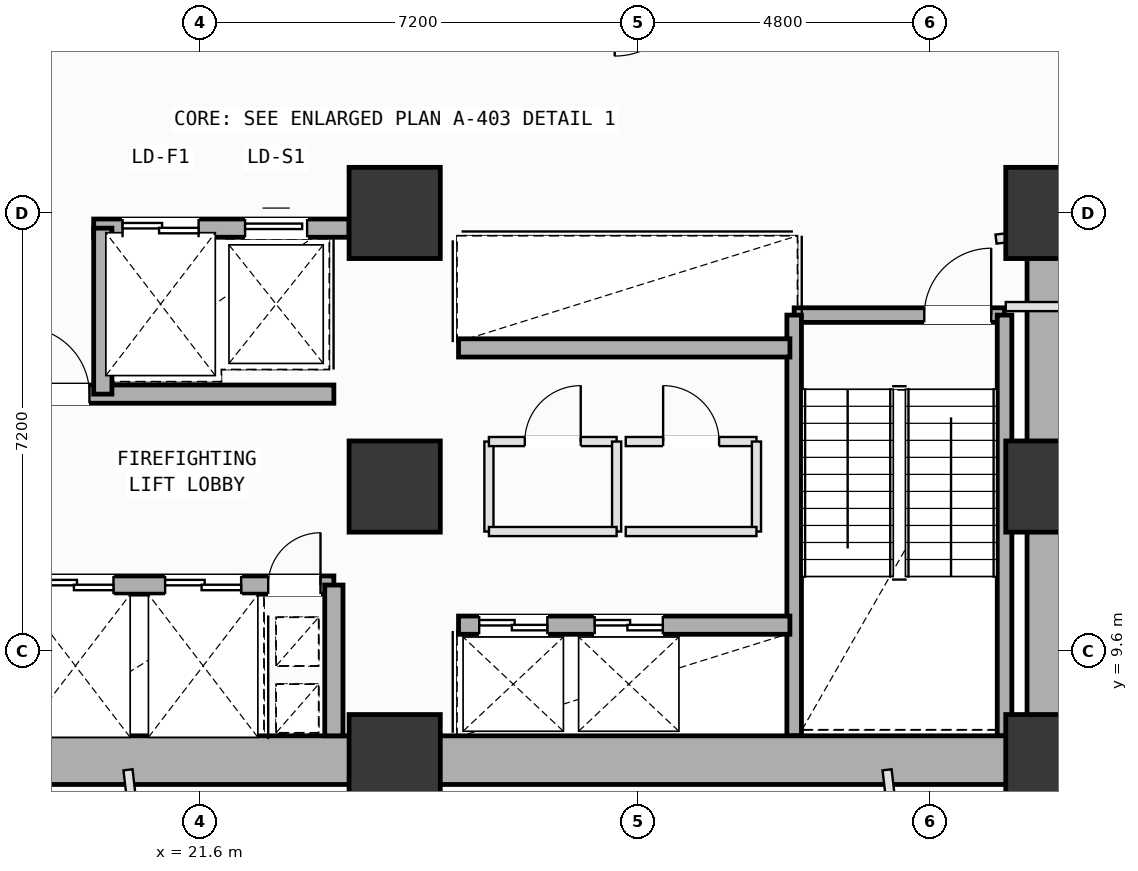
"""IFC4 building model, lengths in metres.
Left out: names, types, materials, properties, quantities, classifications, styles, units other than length and angle.
Written with IfcOpenShell. Run it as: python <this file> out.ifc"""

import sys

from ifc_helpers import new_model, si_unit, direction, frame, frame_2d, origin, origin_2d, place, context, subcontext, project, spatial, rectangle, extrude, element, fill, save


model = new_model("IFC4")
c1 = context("Model", 3, precision=1e-05, world=origin(), true_north=direction((0.0, 1.0)))
c2 = subcontext(c1, "Body", "Model", "MODEL_VIEW")
j1 = project(units=[si_unit("LENGTHUNIT", "METRE"), si_unit("PLANEANGLEUNIT", "RADIAN")], contexts=[c1])
p1 = place(None, origin())
s1 = spatial("IfcSite", under=j1, at=p1, CompositionType="ELEMENT")
p2 = place(p1, origin())
s2 = spatial("IfcBuilding", under=s1, at=p2, CompositionType="ELEMENT")
p3 = place(p2, frame((0.0, 0.0, 51.0)))
s3 = spatial("IfcBuildingStorey", under=s2, at=p3, CompositionType="ELEMENT", Elevation=51.0)
for number, where, z_axis, x_axis in (
    (1, (24.8, 7.8, 0.0), (0.0, 0.0, 1.0), (1.0, 0.0, 0.0)),
    (2, (24.8, 12.3, 0.0), (0.0, 0.0, 1.0), (1.0, 0.0, 0.0)),
    (3, (24.8, 16.8, 0.0), (0.0, 0.0, 1.0), (1.0, 0.0, 0.0)),
    (4, (35.6, 7.8, 0.0), (0.0, 0.0, 1.0), (1.0, 0.0, 0.0)),
    (5, (35.6, 12.3, 0.0), (0.0, 0.0, 1.0), (1.0, 0.0, 0.0)),
    (6, (35.6, 16.8, 0.0), (0.0, 0.0, 1.0), (1.0, 0.0, 0.0)),
):
    element("IfcColumn", number, at=place(p3, frame(where, z_axis=z_axis, x_axis=x_axis)), inside=s3, PredefinedType="COLUMN", context=c2, shape_type="SweptSolid", body=[
        extrude(rectangle(XDim=1.5, YDim=1.5, at=origin_2d()), origin(), (0.0, 0.0, 1.0), 4.0),
    ])
p4 = place(p3, frame((31.37, 15.12, 0.0), z_axis=(0.0, 0.0, 1.0), x_axis=(1.0, 0.0, 0.0)))
e7 = element("IfcWall", 7, at=p4, inside=s3, PredefinedType="SOLIDWALL", context=c2, shape_type="SweptSolid", body=[
    extrude(rectangle(XDim=3.46, YDim=0.24, at=frame_2d((1.73, 0.0))), origin(), (0.0, 0.0, 1.0), 3.78),
])
p5 = place(p4, frame((2.14, 0.0, 0.0)))
e8 = element("IfcOpeningElement", 8, at=p5, cuts=e7, PredefinedType="OPENING", context=c2, shape_type="SweptSolid", body=[
    extrude(rectangle(XDim=1.1, YDim=2.15, at=frame_2d((0.55, 1.075))), frame((0.0, 0.13, 0.0), z_axis=(0.0, -1.0, 0.0), x_axis=(1.0, 0.0, 0.0)), (0.0, 0.0, 1.0), 0.26),
])
for number, where, z_axis, x_axis in (
    (9, (34.83, 15.12, 0.0), (0.0, 0.0, 1.0), (0.0, -1.0, 0.0)),
    (10, (31.37, 8.2, 0.0), (0.0, 0.0, 1.0), (0.0, 1.0, 0.0)),
):
    element("IfcWall", number, at=place(p3, frame(where, z_axis=z_axis, x_axis=x_axis)), inside=s3, PredefinedType="SOLIDWALL", context=c2, shape_type="SweptSolid", body=[
        extrude(rectangle(XDim=6.92, YDim=0.24, at=frame_2d((3.46, 0.0))), origin(), (0.0, 0.0, 1.0), 3.78),
    ])
for number, where, z_axis, x_axis in (
    (11, (14.0, 7.8, 0.0), (0.0, 0.0, 1.0), (1.0, 0.0, 0.0)),
    (12, (24.8, 7.8, 0.0), (0.0, 0.0, 1.0), (1.0, 0.0, 0.0)),
):
    element("IfcWall", number, at=place(p3, frame(where, z_axis=z_axis, x_axis=x_axis)), inside=s3, PredefinedType="SHEAR", context=c2, shape_type="SweptSolid", body=[
        extrude(rectangle(XDim=10.8, YDim=0.8, at=frame_2d((5.4, 0.0))), origin(), (0.0, 0.0, 1.0), 3.78),
    ])
p6 = place(p3, frame((35.6, 7.8, 0.0), z_axis=(0.0, 0.0, 1.0), x_axis=(0.0, 1.0, 0.0)))
e13 = element("IfcWall", 13, at=p6, inside=s3, PredefinedType="SHEAR", context=c2, shape_type="SweptSolid", body=[
    extrude(rectangle(XDim=9.0, YDim=0.8, at=frame_2d((4.5, 0.0))), origin(), (0.0, 0.0, 1.0), 3.78),
])
p7 = place(p3, frame((19.85, 16.55, 0.0), z_axis=(0.0, 0.0, 1.0), x_axis=(1.0, 0.0, 0.0)))
e14 = element("IfcWall", 14, at=p7, inside=s3, PredefinedType="SOLIDWALL", context=c2, shape_type="SweptSolid", body=[
    extrude(rectangle(XDim=4.2, YDim=0.3, at=frame_2d((2.1, 0.0))), origin(), (0.0, 0.0, 1.0), 3.78),
])
p8 = place(p7, frame((0.475, 0.0, 0.0)))
e15 = element("IfcOpeningElement", 15, at=p8, cuts=e14, PredefinedType="OPENING", context=c2, shape_type="SweptSolid", body=[
    extrude(rectangle(XDim=1.25, YDim=2.18, at=frame_2d((0.625, 1.09))), frame((0.0, 0.16, 0.0), z_axis=(0.0, -1.0, 0.0), x_axis=(1.0, 0.0, 0.0)), (0.0, 0.0, 1.0), 0.32),
])
p9 = place(p7, frame((2.49, 0.0, 0.0)))
e16 = element("IfcOpeningElement", 16, at=p9, cuts=e14, PredefinedType="OPENING", context=c2, shape_type="SweptSolid", body=[
    extrude(rectangle(XDim=1.02, YDim=2.12, at=frame_2d((0.51, 1.06))), frame((0.0, 0.16, 0.0), z_axis=(0.0, -1.0, 0.0), x_axis=(1.0, 0.0, 0.0)), (0.0, 0.0, 1.0), 0.32),
])
p10 = place(p3, frame((18.5, 10.68, 0.0), z_axis=(0.0, 0.0, 1.0), x_axis=(1.0, 0.0, 0.0)))
e17 = element("IfcWall", 17, at=p10, inside=s3, PredefinedType="SOLIDWALL", context=c2, shape_type="SweptSolid", body=[
    extrude(rectangle(XDim=5.3, YDim=0.3, at=frame_2d((2.65, 0.0))), origin(), (0.0, 0.0, 1.0), 3.78),
])
p11 = place(p10, frame((4.22, 0.0, 0.0)))
e18 = element("IfcOpeningElement", 18, at=p11, cuts=e17, PredefinedType="OPENING", context=c2, shape_type="SweptSolid", body=[
    extrude(rectangle(XDim=0.86, YDim=2.06, at=frame_2d((0.43, 1.03))), frame((0.0, 0.16, 0.0), z_axis=(0.0, -1.0, 0.0), x_axis=(1.0, 0.0, 0.0)), (0.0, 0.0, 1.0), 0.32),
])
p12 = place(p10, frame((0.425, 0.0, 0.0)))
e19 = element("IfcOpeningElement", 19, at=p12, cuts=e17, PredefinedType="OPENING", context=c2, shape_type="SweptSolid", body=[
    extrude(rectangle(XDim=1.25, YDim=2.18, at=frame_2d((0.625, 1.09))), frame((0.0, 0.16, 0.0), z_axis=(0.0, -1.0, 0.0), x_axis=(1.0, 0.0, 0.0)), (0.0, 0.0, 1.0), 0.32),
])
p13 = place(p10, frame((2.525, 0.0, 0.0)))
e20 = element("IfcOpeningElement", 20, at=p13, cuts=e17, PredefinedType="OPENING", context=c2, shape_type="SweptSolid", body=[
    extrude(rectangle(XDim=1.25, YDim=2.18, at=frame_2d((0.625, 1.09))), frame((0.0, 0.16, 0.0), z_axis=(0.0, -1.0, 0.0), x_axis=(1.0, 0.0, 0.0)), (0.0, 0.0, 1.0), 0.32),
])
p14 = place(p3, frame((18.5, 13.82, 0.0), z_axis=(0.0, 0.0, 1.0), x_axis=(1.0, 0.0, 0.0)))
e21 = element("IfcWall", 21, at=p14, inside=s3, PredefinedType="SOLIDWALL", context=c2, shape_type="SweptSolid", body=[
    extrude(rectangle(XDim=5.3, YDim=0.3, at=frame_2d((2.65, 0.0))), origin(), (0.0, 0.0, 1.0), 3.78),
])
p15 = place(p14, frame((0.18, 0.0, 0.0)))
e22 = element("IfcOpeningElement", 22, at=p15, cuts=e21, PredefinedType="OPENING", context=c2, shape_type="SweptSolid", body=[
    extrude(rectangle(XDim=1.1, YDim=2.15, at=frame_2d((0.55, 1.075))), frame((0.0, 0.16, 0.0), z_axis=(0.0, -1.0, 0.0), x_axis=(1.0, 0.0, 0.0)), (0.0, 0.0, 1.0), 0.32),
])
p16 = place(p3, frame((23.8, 8.2, 0.0), z_axis=(0.0, 0.0, 1.0), x_axis=(0.0, 1.0, 0.0)))
e23 = element("IfcWall", 23, at=p16, inside=s3, PredefinedType="SOLIDWALL", context=c2, shape_type="SweptSolid", body=[
    extrude(rectangle(XDim=2.48, YDim=0.3, at=frame_2d((1.24, 0.0))), origin(), (0.0, 0.0, 1.0), 3.78),
])
p17 = place(p3, frame((20.0, 13.82, 0.0), z_axis=(0.0, 0.0, 1.0), x_axis=(0.0, 1.0, 0.0)))
e24 = element("IfcWall", 24, at=p17, inside=s3, PredefinedType="SOLIDWALL", context=c2, shape_type="SweptSolid", body=[
    extrude(rectangle(XDim=2.73, YDim=0.3, at=frame_2d((1.365, 0.0))), origin(), (0.0, 0.0, 1.0), 3.78),
])
p18 = place(p3, frame((25.85, 10.02, 0.0), z_axis=(0.0, 0.0, 1.0), x_axis=(1.0, 0.0, 0.0)))
e25 = element("IfcWall", 25, at=p18, inside=s3, PredefinedType="SOLIDWALL", context=c2, shape_type="SweptSolid", body=[
    extrude(rectangle(XDim=5.45, YDim=0.3, at=frame_2d((2.725, 0.0))), origin(), (0.0, 0.0, 1.0), 3.78),
])
p19 = place(p18, frame((0.34, 0.0, 0.0)))
e26 = element("IfcOpeningElement", 26, at=p19, cuts=e25, PredefinedType="OPENING", context=c2, shape_type="SweptSolid", body=[
    extrude(rectangle(XDim=1.12, YDim=2.15, at=frame_2d((0.56, 1.075))), frame((0.0, 0.16, 0.0), z_axis=(0.0, -1.0, 0.0), x_axis=(1.0, 0.0, 0.0)), (0.0, 0.0, 1.0), 0.32),
])
p20 = place(p18, frame((2.24, 0.0, 0.0)))
e27 = element("IfcOpeningElement", 27, at=p20, cuts=e25, PredefinedType="OPENING", context=c2, shape_type="SweptSolid", body=[
    extrude(rectangle(XDim=1.12, YDim=2.15, at=frame_2d((0.56, 1.075))), frame((0.0, 0.16, 0.0), z_axis=(0.0, -1.0, 0.0), x_axis=(1.0, 0.0, 0.0)), (0.0, 0.0, 1.0), 0.32),
])
p21 = place(p3, frame((25.85, 14.58, 0.0), z_axis=(0.0, 0.0, 1.0), x_axis=(1.0, 0.0, 0.0)))
e28 = element("IfcWall", 28, at=p21, inside=s3, PredefinedType="SOLIDWALL", context=c2, shape_type="SweptSolid", body=[
    extrude(rectangle(XDim=5.45, YDim=0.3, at=frame_2d((2.725, 0.0))), origin(), (0.0, 0.0, 1.0), 3.78),
])
p22 = place(p3, frame((26.35, 11.56, 0.0), z_axis=(0.0, 0.0, 1.0), x_axis=(0.0, 1.0, 0.0)))
e29 = element("IfcWall", 29, at=p22, inside=s3, PredefinedType="PARTITIONING", context=c2, shape_type="SweptSolid", body=[
    extrude(rectangle(XDim=1.48, YDim=0.15, at=frame_2d((0.74, 0.0))), origin(), (0.0, 0.0, 1.0), 3.78),
])
p23 = place(p3, frame((26.35, 13.04, 0.0), z_axis=(0.0, 0.0, 1.0), x_axis=(1.0, 0.0, 0.0)))
e30 = element("IfcWall", 30, at=p23, inside=s3, PredefinedType="PARTITIONING", context=c2, shape_type="SweptSolid", body=[
    extrude(rectangle(XDim=2.1, YDim=0.15, at=frame_2d((1.05, 0.0))), origin(), (0.0, 0.0, 1.0), 3.78),
])
p24 = place(p23, frame((0.59, 0.0, 0.0)))
e31 = element("IfcOpeningElement", 31, at=p24, cuts=e30, PredefinedType="OPENING", context=c2, shape_type="SweptSolid", body=[
    extrude(rectangle(XDim=0.92, YDim=2.1, at=frame_2d((0.46, 1.05))), frame((0.0, 0.085, 0.0), z_axis=(0.0, -1.0, 0.0), x_axis=(1.0, 0.0, 0.0)), (0.0, 0.0, 1.0), 0.17),
])
p25 = place(p3, frame((28.45, 13.04, 0.0), z_axis=(0.0, 0.0, 1.0), x_axis=(0.0, -1.0, 0.0)))
e32 = element("IfcWall", 32, at=p25, inside=s3, PredefinedType="PARTITIONING", context=c2, shape_type="SweptSolid", body=[
    extrude(rectangle(XDim=1.48, YDim=0.15, at=frame_2d((0.74, 0.0))), origin(), (0.0, 0.0, 1.0), 3.78),
])
p26 = place(p3, frame((28.45, 11.56, 0.0), z_axis=(0.0, 0.0, 1.0), x_axis=(-1.0, 0.0, 0.0)))
e33 = element("IfcWall", 33, at=p26, inside=s3, PredefinedType="PARTITIONING", context=c2, shape_type="SweptSolid", body=[
    extrude(rectangle(XDim=2.1, YDim=0.15, at=frame_2d((1.05, 0.0))), origin(), (0.0, 0.0, 1.0), 3.78),
])
p27 = place(p3, frame((28.6, 13.04, 0.0), z_axis=(0.0, 0.0, 1.0), x_axis=(1.0, 0.0, 0.0)))
e34 = element("IfcWall", 34, at=p27, inside=s3, PredefinedType="PARTITIONING", context=c2, shape_type="SweptSolid", body=[
    extrude(rectangle(XDim=2.15, YDim=0.15, at=frame_2d((1.075, 0.0))), origin(), (0.0, 0.0, 1.0), 3.78),
])
p28 = place(p27, frame((0.615, 0.0, 0.0)))
e35 = element("IfcOpeningElement", 35, at=p28, cuts=e34, PredefinedType="OPENING", context=c2, shape_type="SweptSolid", body=[
    extrude(rectangle(XDim=0.92, YDim=2.1, at=frame_2d((0.46, 1.05))), frame((0.0, 0.085, 0.0), z_axis=(0.0, -1.0, 0.0), x_axis=(1.0, 0.0, 0.0)), (0.0, 0.0, 1.0), 0.17),
])
p29 = place(p3, frame((30.75, 13.04, 0.0), z_axis=(0.0, 0.0, 1.0), x_axis=(0.0, -1.0, 0.0)))
e36 = element("IfcWall", 36, at=p29, inside=s3, PredefinedType="PARTITIONING", context=c2, shape_type="SweptSolid", body=[
    extrude(rectangle(XDim=1.48, YDim=0.15, at=frame_2d((0.74, 0.0))), origin(), (0.0, 0.0, 1.0), 3.78),
])
p30 = place(p3, frame((30.75, 11.56, 0.0), z_axis=(0.0, 0.0, 1.0), x_axis=(-1.0, 0.0, 0.0)))
e37 = element("IfcWall", 37, at=p30, inside=s3, PredefinedType="PARTITIONING", context=c2, shape_type="SweptSolid", body=[
    extrude(rectangle(XDim=2.15, YDim=0.15, at=frame_2d((1.075, 0.0))), origin(), (0.0, 0.0, 1.0), 3.78),
])
p31 = place(p3, frame((20.414, 7.641, 0.0), z_axis=(0.0, 0.0, 1.0), x_axis=(0.115769975506, -0.993276050638, 0.0)))
e38 = element("IfcWall", 38, at=p31, inside=s3, PredefinedType="PARTITIONING", context=c2, shape_type="SweptSolid", body=[
    extrude(rectangle(XDim=6.599, YDim=0.15, at=frame_2d((3.299, 0.0))), origin(), (0.0, 0.0, 1.0), 3.78),
])
p32 = place(p31, frame((3.02, 0.0, 0.0)))
e39 = element("IfcOpeningElement", 39, at=p32, cuts=e38, PredefinedType="OPENING", context=c2, shape_type="SweptSolid", body=[
    extrude(rectangle(XDim=0.86, YDim=2.06, at=frame_2d((0.43, 1.03))), frame((0.0, 0.085, 0.0), z_axis=(0.0, -1.0, 0.0), x_axis=(1.0, 0.0, 0.0)), (0.0, 0.0, 1.0), 0.17),
])
p33 = place(p3, frame((32.898, 7.641, 0.0), z_axis=(0.0, 0.0, 1.0), x_axis=(0.115606435858, -0.99329509814, 0.0)))
e40 = element("IfcWall", 40, at=p33, inside=s3, PredefinedType="PARTITIONING", context=c2, shape_type="SweptSolid", body=[
    extrude(rectangle(XDim=5.518, YDim=0.15, at=frame_2d((2.759, 0.0))), origin(), (0.0, 0.0, 1.0), 3.78),
])
p34 = place(p33, frame((2.48, 0.0, 0.0)))
e41 = element("IfcOpeningElement", 41, at=p34, cuts=e40, PredefinedType="OPENING", context=c2, shape_type="SweptSolid", body=[
    extrude(rectangle(XDim=0.86, YDim=2.06, at=frame_2d((0.43, 1.03))), frame((0.0, 0.085, 0.0), z_axis=(0.0, -1.0, 0.0), x_axis=(1.0, 0.0, 0.0)), (0.0, 0.0, 1.0), 0.17),
])
p35 = place(p3, frame((35.6, 7.5, 0.0), z_axis=(0.0, 0.0, 1.0), x_axis=(1.0, 0.0, 0.0)))
e42 = element("IfcWall", 42, at=p35, inside=s3, PredefinedType="PARTITIONING", context=c2, shape_type="SweptSolid", body=[
    extrude(rectangle(XDim=0.55, YDim=0.15, at=frame_2d((0.275, 0.0))), origin(), (0.0, 0.0, 1.0), 3.78),
])
p36 = place(p3, frame((36.15, 15.26, 0.0), z_axis=(0.0, 0.0, 1.0), x_axis=(-1.0, 0.0, 0.0)))
e43 = element("IfcWall", 43, at=p36, inside=s3, PredefinedType="PARTITIONING", context=c2, shape_type="SweptSolid", body=[
    extrude(rectangle(XDim=1.3, YDim=0.15, at=frame_2d((0.65, 0.0))), origin(), (0.0, 0.0, 1.0), 3.78),
])
p37 = place(p3, frame((34.69, 16.37, 0.0), z_axis=(0.0, 0.0, 1.0), x_axis=(0.993332795397, 0.115282078349, 0.0)))
e44 = element("IfcWall", 44, at=p37, inside=s3, PredefinedType="PARTITIONING", context=c2, shape_type="SweptSolid", body=[
    extrude(rectangle(XDim=1.127, YDim=0.15, at=frame_2d((0.563, 0.0))), origin(), (0.0, 0.0, 1.0), 2.865),
])
p38 = place(p5, origin())
e45 = element("IfcDoor", 45, at=p38, inside=s3, OperationType="SINGLE_SWING_RIGHT", PredefinedType="DOOR", context=c2, shape_type="SweptSolid", body=[
    extrude(rectangle(XDim=1.1, YDim=2.15, at=frame_2d((0.55, 1.075))), frame((0.0, 0.025, 0.0), z_axis=(0.0, -1.0, 0.0), x_axis=(1.0, 0.0, 0.0)), (0.0, 0.0, 1.0), 0.05),
])
fill(e8, e45)
p39 = place(p11, origin())
e46 = element("IfcDoor", 46, at=p39, inside=s3, OperationType="SINGLE_SWING_RIGHT", PredefinedType="DOOR", context=c2, shape_type="SweptSolid", body=[
    extrude(rectangle(XDim=0.86, YDim=2.06, at=frame_2d((0.43, 1.03))), frame((0.0, 0.025, 0.0), z_axis=(0.0, -1.0, 0.0), x_axis=(1.0, 0.0, 0.0)), (0.0, 0.0, 1.0), 0.05),
])
fill(e18, e46)
p40 = place(p15, origin())
e47 = element("IfcDoor", 47, at=p40, inside=s3, OperationType="SINGLE_SWING_LEFT", PredefinedType="DOOR", context=c2, shape_type="SweptSolid", body=[
    extrude(rectangle(XDim=1.1, YDim=2.15, at=frame_2d((0.55, 1.075))), frame((0.0, 0.025, 0.0), z_axis=(0.0, -1.0, 0.0), x_axis=(1.0, 0.0, 0.0)), (0.0, 0.0, 1.0), 0.05),
])
fill(e22, e47)
p41 = place(p12, origin())
e48 = element("IfcDoor", 48, at=p41, inside=s3, OperationType="DOUBLE_DOOR_SLIDING", PredefinedType="DOOR", context=c2, shape_type="SweptSolid", body=[
    extrude(rectangle(XDim=1.25, YDim=2.18, at=frame_2d((0.625, 1.09))), frame((0.0, 0.025, 0.0), z_axis=(0.0, -1.0, 0.0), x_axis=(1.0, 0.0, 0.0)), (0.0, 0.0, 1.0), 0.05),
])
fill(e19, e48)
p42 = place(p13, origin())
e49 = element("IfcDoor", 49, at=p42, inside=s3, OperationType="DOUBLE_DOOR_SLIDING", PredefinedType="DOOR", context=c2, shape_type="SweptSolid", body=[
    extrude(rectangle(XDim=1.25, YDim=2.18, at=frame_2d((0.625, 1.09))), frame((0.0, 0.025, 0.0), z_axis=(0.0, -1.0, 0.0), x_axis=(1.0, 0.0, 0.0)), (0.0, 0.0, 1.0), 0.05),
])
fill(e20, e49)
p43 = place(p19, origin())
e50 = element("IfcDoor", 50, at=p43, inside=s3, OperationType="DOUBLE_DOOR_SLIDING", PredefinedType="DOOR", context=c2, shape_type="SweptSolid", body=[
    extrude(rectangle(XDim=1.12, YDim=2.15, at=frame_2d((0.56, 1.075))), frame((0.0, 0.025, 0.0), z_axis=(0.0, -1.0, 0.0), x_axis=(1.0, 0.0, 0.0)), (0.0, 0.0, 1.0), 0.05),
])
fill(e26, e50)
p44 = place(p20, origin())
e51 = element("IfcDoor", 51, at=p44, inside=s3, OperationType="DOUBLE_DOOR_SLIDING", PredefinedType="DOOR", context=c2, shape_type="SweptSolid", body=[
    extrude(rectangle(XDim=1.12, YDim=2.15, at=frame_2d((0.56, 1.075))), frame((0.0, 0.025, 0.0), z_axis=(0.0, -1.0, 0.0), x_axis=(1.0, 0.0, 0.0)), (0.0, 0.0, 1.0), 0.05),
])
fill(e27, e51)
p45 = place(p8, origin())
e52 = element("IfcDoor", 52, at=p45, inside=s3, OperationType="DOUBLE_DOOR_SLIDING", PredefinedType="DOOR", context=c2, shape_type="SweptSolid", body=[
    extrude(rectangle(XDim=1.25, YDim=2.18, at=frame_2d((0.625, 1.09))), frame((0.0, 0.025, 0.0), z_axis=(0.0, -1.0, 0.0), x_axis=(1.0, 0.0, 0.0)), (0.0, 0.0, 1.0), 0.05),
])
fill(e15, e52)
p46 = place(p9, origin())
e53 = element("IfcDoor", 53, at=p46, inside=s3, OperationType="SLIDING_TO_LEFT", PredefinedType="DOOR", context=c2, shape_type="SweptSolid", body=[
    extrude(rectangle(XDim=1.02, YDim=2.12, at=frame_2d((0.51, 1.06))), frame((0.0, 0.025, 0.0), z_axis=(0.0, -1.0, 0.0), x_axis=(1.0, 0.0, 0.0)), (0.0, 0.0, 1.0), 0.05),
])
fill(e16, e53)
p47 = place(p24, origin())
e54 = element("IfcDoor", 54, at=p47, inside=s3, OperationType="SINGLE_SWING_RIGHT", PredefinedType="DOOR", context=c2, shape_type="SweptSolid", body=[
    extrude(rectangle(XDim=0.92, YDim=2.1, at=frame_2d((0.46, 1.05))), frame((0.0, 0.025, 0.0), z_axis=(0.0, -1.0, 0.0), x_axis=(1.0, 0.0, 0.0)), (0.0, 0.0, 1.0), 0.05),
])
fill(e31, e54)
p48 = place(p28, origin())
e55 = element("IfcDoor", 55, at=p48, inside=s3, OperationType="SINGLE_SWING_LEFT", PredefinedType="DOOR", context=c2, shape_type="SweptSolid", body=[
    extrude(rectangle(XDim=0.92, YDim=2.1, at=frame_2d((0.46, 1.05))), frame((0.0, 0.025, 0.0), z_axis=(0.0, -1.0, 0.0), x_axis=(1.0, 0.0, 0.0)), (0.0, 0.0, 1.0), 0.05),
])
fill(e35, e55)
save(model, sys.argv[1])
